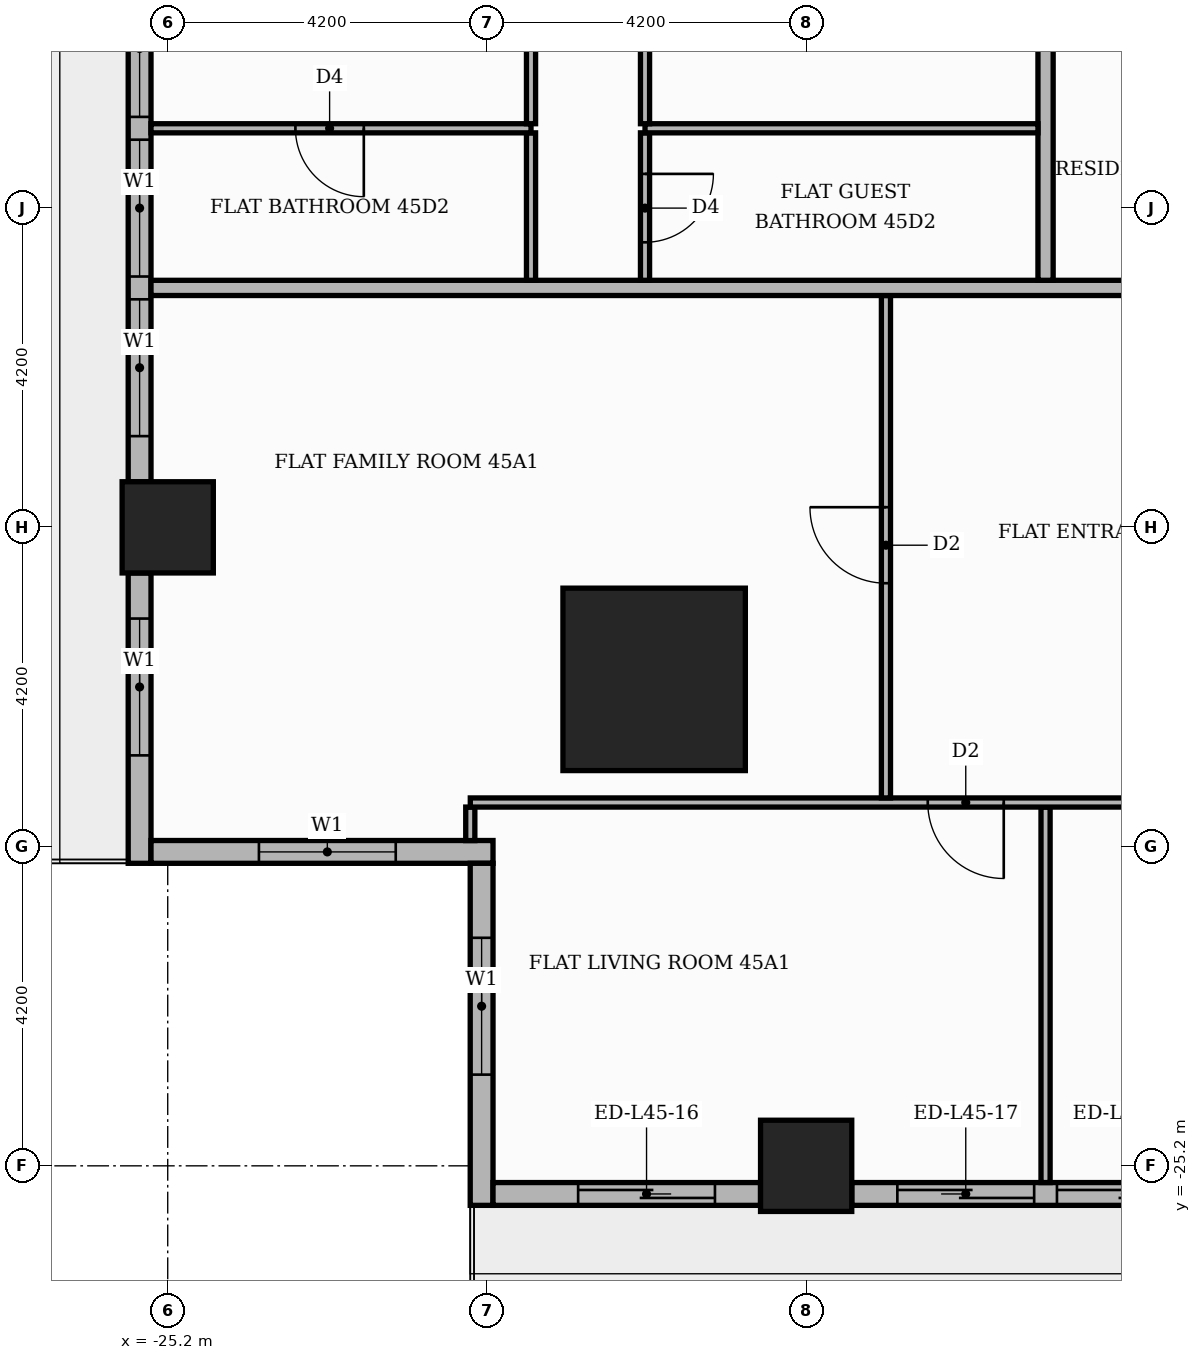
"""IFC4 building model, lengths in metres.
Left out: names, types, materials, properties, quantities, classifications, styles, units other than length and angle.
Written with IfcOpenShell. Run it as: python <this file> out.ifc"""

import sys

from ifc_helpers import new_model, si_unit, direction, frame, frame_2d, origin, origin_2d, place, context, subcontext, project, spatial, rectangle, extrude, element, fill, save


model = new_model("IFC4")
c1 = context("Model", 3, precision=1e-05, world=origin(), true_north=direction((0.0, 1.0)))
c2 = subcontext(c1, "Body", "Model", "MODEL_VIEW")
j1 = project(units=[si_unit("LENGTHUNIT", "METRE"), si_unit("PLANEANGLEUNIT", "RADIAN")], contexts=[c1])
p1 = place(None, origin())
s1 = spatial("IfcSite", under=j1, at=p1, CompositionType="ELEMENT")
p2 = place(p1, origin())
s2 = spatial("IfcBuilding", under=s1, at=p2, CompositionType="ELEMENT")
p3 = place(p2, frame((0.0, 0.0, 192.3)))
s3 = spatial("IfcBuildingStorey", under=s2, at=p3, CompositionType="ELEMENT", Elevation=192.3)
p4 = place(p3, frame((-18.8, -18.8, 0.0), z_axis=(0.0, 0.0, 1.0), x_axis=(1.0, 0.0, 0.0)))
e1 = element("IfcColumn", 1, at=p4, inside=s3, PredefinedType="COLUMN", context=c2, shape_type="SweptSolid", body=[
    extrude(rectangle(XDim=2.4, YDim=2.4, at=origin_2d()), origin(), (0.0, 0.0, 1.0), 3.9),
])
for number, where, z_axis, x_axis in (
    (2, (-16.8, -25.2, 0.0), (0.0, 0.0, 1.0), (1.0, 0.0, 0.0)),
    (3, (-25.2, -16.8, 0.0), (0.0, 0.0, 1.0), (1.0, 0.0, 0.0)),
):
    element("IfcColumn", number, at=place(p3, frame(where, z_axis=z_axis, x_axis=x_axis)), inside=s3, PredefinedType="COLUMN", context=c2, shape_type="SweptSolid", body=[
        extrude(rectangle(XDim=1.2, YDim=1.2, at=origin_2d()), origin(), (0.0, 0.0, 1.0), 3.9),
    ])
p5 = place(p3, frame((-25.57, -9.0, 0.0), z_axis=(0.0, 0.0, 1.0), x_axis=(0.0, -1.0, 0.0)))
e4 = element("IfcWall", 4, at=p5, inside=s3, PredefinedType="STANDARD", context=c2, shape_type="SweptSolid", body=[
    extrude(rectangle(XDim=7.2, YDim=0.3, at=frame_2d((3.6, 0.0))), origin(), (0.0, 0.0, 1.0), 3.48),
])
p6 = place(p5, frame((0.6, 0.0, 0.9)))
e5 = element("IfcOpeningElement", 5, at=p6, cuts=e4, PredefinedType="OPENING", context=c2, shape_type="SweptSolid", body=[
    extrude(rectangle(XDim=1.8, YDim=2.1, at=frame_2d((0.9, 1.05))), frame((0.0, 0.16, 0.0), z_axis=(0.0, -1.0, 0.0), x_axis=(1.0, 0.0, 0.0)), (0.0, 0.0, 1.0), 0.32),
])
p7 = place(p5, frame((2.7, 0.0, 0.9)))
e6 = element("IfcOpeningElement", 6, at=p7, cuts=e4, PredefinedType="OPENING", context=c2, shape_type="SweptSolid", body=[
    extrude(rectangle(XDim=1.8, YDim=2.1, at=frame_2d((0.9, 1.05))), frame((0.0, 0.16, 0.0), z_axis=(0.0, -1.0, 0.0), x_axis=(1.0, 0.0, 0.0)), (0.0, 0.0, 1.0), 0.32),
])
p8 = place(p5, frame((4.8, 0.0, 0.9)))
e7 = element("IfcOpeningElement", 7, at=p8, cuts=e4, PredefinedType="OPENING", context=c2, shape_type="SweptSolid", body=[
    extrude(rectangle(XDim=1.8, YDim=2.1, at=frame_2d((0.9, 1.05))), frame((0.0, 0.16, 0.0), z_axis=(0.0, -1.0, 0.0), x_axis=(1.0, 0.0, 0.0)), (0.0, 0.0, 1.0), 0.32),
])
p9 = place(p3, frame((-25.57, -17.4, 0.0), z_axis=(0.0, 0.0, 1.0), x_axis=(0.0, -1.0, 0.0)))
e8 = element("IfcWall", 8, at=p9, inside=s3, PredefinedType="STANDARD", context=c2, shape_type="SweptSolid", body=[
    extrude(rectangle(XDim=3.82, YDim=0.3, at=frame_2d((1.91, 0.0))), origin(), (0.0, 0.0, 1.0), 3.48),
])
p10 = place(p9, frame((0.6, 0.0, 0.9)))
e9 = element("IfcOpeningElement", 9, at=p10, cuts=e8, PredefinedType="OPENING", context=c2, shape_type="SweptSolid", body=[
    extrude(rectangle(XDim=1.8, YDim=2.1, at=frame_2d((0.9, 1.05))), frame((0.0, 0.16, 0.0), z_axis=(0.0, -1.0, 0.0), x_axis=(1.0, 0.0, 0.0)), (0.0, 0.0, 1.0), 0.32),
])
p11 = place(p3, frame((-25.42, -21.07, 0.0), z_axis=(0.0, 0.0, 1.0), x_axis=(1.0, 0.0, 0.0)))
e10 = element("IfcWall", 10, at=p11, inside=s3, PredefinedType="STANDARD", context=c2, shape_type="SweptSolid", body=[
    extrude(rectangle(XDim=4.5, YDim=0.3, at=frame_2d((2.25, 0.0))), origin(), (0.0, 0.0, 1.0), 3.48),
])
p12 = place(p11, frame((1.42, 0.0, 0.9)))
e11 = element("IfcOpeningElement", 11, at=p12, cuts=e10, PredefinedType="OPENING", context=c2, shape_type="SweptSolid", body=[
    extrude(rectangle(XDim=1.8, YDim=2.1, at=frame_2d((0.9, 1.05))), frame((0.0, 0.16, 0.0), z_axis=(0.0, -1.0, 0.0), x_axis=(1.0, 0.0, 0.0)), (0.0, 0.0, 1.0), 0.32),
])
p13 = place(p3, frame((-21.07, -21.22, 0.0), z_axis=(0.0, 0.0, 1.0), x_axis=(0.0, -1.0, 0.0)))
e12 = element("IfcWall", 12, at=p13, inside=s3, PredefinedType="STANDARD", context=c2, shape_type="SweptSolid", body=[
    extrude(rectangle(XDim=4.5, YDim=0.3, at=frame_2d((2.25, 0.0))), origin(), (0.0, 0.0, 1.0), 3.48),
])
p14 = place(p13, frame((0.98, 0.0, 0.9)))
e13 = element("IfcOpeningElement", 13, at=p14, cuts=e12, PredefinedType="OPENING", context=c2, shape_type="SweptSolid", body=[
    extrude(rectangle(XDim=1.8, YDim=2.1, at=frame_2d((0.9, 1.05))), frame((0.0, 0.16, 0.0), z_axis=(0.0, -1.0, 0.0), x_axis=(1.0, 0.0, 0.0)), (0.0, 0.0, 1.0), 0.32),
])
p15 = place(p3, frame((-20.92, -25.57, 0.0), z_axis=(0.0, 0.0, 1.0), x_axis=(1.0, 0.0, 0.0)))
e14 = element("IfcWall", 14, at=p15, inside=s3, PredefinedType="STANDARD", context=c2, shape_type="SweptSolid", body=[
    extrude(rectangle(XDim=3.52, YDim=0.3, at=frame_2d((1.76, 0.0))), origin(), (0.0, 0.0, 1.0), 3.48),
])
p16 = place(p15, frame((1.12, 0.0, 0.0)))
e15 = element("IfcOpeningElement", 15, at=p16, cuts=e14, PredefinedType="OPENING", context=c2, shape_type="SweptSolid", body=[
    extrude(rectangle(XDim=1.8, YDim=2.4, at=frame_2d((0.9, 1.2))), frame((0.0, 0.16, 0.0), z_axis=(0.0, -1.0, 0.0), x_axis=(1.0, 0.0, 0.0)), (0.0, 0.0, 1.0), 0.32),
])
p17 = place(p3, frame((-16.2, -25.57, 0.0), z_axis=(0.0, 0.0, 1.0), x_axis=(1.0, 0.0, 0.0)))
e16 = element("IfcWall", 16, at=p17, inside=s3, PredefinedType="STANDARD", context=c2, shape_type="SweptSolid", body=[
    extrude(rectangle(XDim=7.2, YDim=0.3, at=frame_2d((3.6, 0.0))), origin(), (0.0, 0.0, 1.0), 3.48),
])
p18 = place(p17, frame((0.6, 0.0, 0.0)))
e17 = element("IfcOpeningElement", 17, at=p18, cuts=e16, PredefinedType="OPENING", context=c2, shape_type="SweptSolid", body=[
    extrude(rectangle(XDim=1.8, YDim=2.4, at=frame_2d((0.9, 1.2))), frame((0.0, 0.16, 0.0), z_axis=(0.0, -1.0, 0.0), x_axis=(1.0, 0.0, 0.0)), (0.0, 0.0, 1.0), 0.32),
])
p19 = place(p17, frame((2.7, 0.0, 0.0)))
e18 = element("IfcOpeningElement", 18, at=p19, cuts=e16, PredefinedType="OPENING", context=c2, shape_type="SweptSolid", body=[
    extrude(rectangle(XDim=1.8, YDim=2.4, at=frame_2d((0.9, 1.2))), frame((0.0, 0.16, 0.0), z_axis=(0.0, -1.0, 0.0), x_axis=(1.0, 0.0, 0.0)), (0.0, 0.0, 1.0), 0.32),
])
p20 = place(p17, frame((4.8, 0.0, 0.9)))
e19 = element("IfcOpeningElement", 19, at=p20, cuts=e16, PredefinedType="OPENING", context=c2, shape_type="SweptSolid", body=[
    extrude(rectangle(XDim=1.8, YDim=2.1, at=frame_2d((0.9, 1.05))), frame((0.0, 0.16, 0.0), z_axis=(0.0, -1.0, 0.0), x_axis=(1.0, 0.0, 0.0)), (0.0, 0.0, 1.0), 0.32),
])
p21 = place(p3, frame((-13.65, -25.42, 0.0), z_axis=(0.0, 0.0, 1.0), x_axis=(0.0, 1.0, 0.0)))
e20 = element("IfcWall", 20, at=p21, inside=s3, PredefinedType="PARTITIONING", context=c2, shape_type="SweptSolid", body=[
    extrude(rectangle(XDim=4.94, YDim=0.12, at=frame_2d((2.47, 0.0))), origin(), (0.0, 0.0, 1.0), 3.48),
])
p22 = place(p3, frame((-21.219, -20.921, 0.0), z_axis=(0.0, 0.0, 1.0), x_axis=(0.0, 1.0, 0.0)))
e21 = element("IfcWall", 21, at=p22, inside=s3, PredefinedType="PARTITIONING", context=c2, shape_type="SweptSolid", body=[
    extrude(rectangle(XDim=0.441, YDim=0.12, at=frame_2d((0.22, 0.0))), origin(), (0.0, 0.0, 1.0), 3.48),
])
p23 = place(p3, frame((-21.219, -20.42, 0.0), z_axis=(0.0, 0.0, 1.0), x_axis=(1.0, 0.0, 0.0)))
e22 = element("IfcWall", 22, at=p23, inside=s3, PredefinedType="PARTITIONING", context=c2, shape_type="SweptSolid", body=[
    extrude(rectangle(XDim=15.869, YDim=0.12, at=frame_2d((7.935, 0.0))), origin(), (0.0, 0.0, 1.0), 3.48),
])
p24 = place(p23, frame((6.019, 0.0, 0.0)))
e23 = element("IfcOpeningElement", 23, at=p24, cuts=e22, PredefinedType="OPENING", context=c2, shape_type="SweptSolid", body=[
    extrude(rectangle(XDim=1.0, YDim=2.1, at=frame_2d((0.5, 1.05))), frame((0.0, 0.07, 0.0), z_axis=(0.0, -1.0, 0.0), x_axis=(1.0, 0.0, 0.0)), (0.0, 0.0, 1.0), 0.14),
])
p25 = place(p23, frame((9.219, 0.0, 0.0)))
e24 = element("IfcOpeningElement", 24, at=p25, cuts=e22, PredefinedType="OPENING", context=c2, shape_type="SweptSolid", body=[
    extrude(rectangle(XDim=0.9, YDim=2.1, at=frame_2d((0.45, 1.05))), frame((0.0, 0.07, 0.0), z_axis=(0.0, -1.0, 0.0), x_axis=(1.0, 0.0, 0.0)), (0.0, 0.0, 1.0), 0.14),
])
p26 = place(p3, frame((-15.75, -20.36, 0.0), z_axis=(0.0, 0.0, 1.0), x_axis=(0.0, 1.0, 0.0)))
e25 = element("IfcWall", 25, at=p26, inside=s3, PredefinedType="PARTITIONING", context=c2, shape_type="SweptSolid", body=[
    extrude(rectangle(XDim=6.61, YDim=0.12, at=frame_2d((3.305, 0.0))), origin(), (0.0, 0.0, 1.0), 3.48),
])
p27 = place(p26, frame((2.825, 0.0, 0.0)))
e26 = element("IfcOpeningElement", 26, at=p27, cuts=e25, PredefinedType="OPENING", context=c2, shape_type="SweptSolid", body=[
    extrude(rectangle(XDim=1.0, YDim=2.1, at=frame_2d((0.5, 1.05))), frame((0.0, 0.07, 0.0), z_axis=(0.0, -1.0, 0.0), x_axis=(1.0, 0.0, 0.0)), (0.0, 0.0, 1.0), 0.14),
])
p28 = place(p3, frame((-25.42, -13.65, 0.0), z_axis=(0.0, 0.0, 1.0), x_axis=(1.0, 0.0, 0.0)))
e27 = element("IfcWall", 27, at=p28, inside=s3, PredefinedType="PARTITIONING", context=c2, shape_type="SweptSolid", body=[
    extrude(rectangle(XDim=39.07, YDim=0.2, at=frame_2d((19.535, 0.0))), origin(), (0.0, 0.0, 1.0), 3.48),
])
p29 = place(p28, frame((13.32, 0.0, 0.0)))
e28 = element("IfcOpeningElement", 28, at=p29, cuts=e27, PredefinedType="OPENING", context=c2, shape_type="SweptSolid", body=[
    extrude(rectangle(XDim=1.1, YDim=2.4, at=frame_2d((0.55, 1.2))), frame((0.0, 0.11, 0.0), z_axis=(0.0, -1.0, 0.0), x_axis=(1.0, 0.0, 0.0)), (0.0, 0.0, 1.0), 0.22),
])
p30 = place(p28, frame((25.92, 0.0, 0.0)))
e29 = element("IfcOpeningElement", 29, at=p30, cuts=e27, PredefinedType="OPENING", context=c2, shape_type="SweptSolid", body=[
    extrude(rectangle(XDim=1.1, YDim=2.4, at=frame_2d((0.55, 1.2))), frame((0.0, 0.11, 0.0), z_axis=(0.0, -1.0, 0.0), x_axis=(1.0, 0.0, 0.0)), (0.0, 0.0, 1.0), 0.22),
])
p31 = place(p3, frame((-20.42, -13.55, 0.0), z_axis=(0.0, 0.0, 1.0), x_axis=(0.0, 1.0, 0.0)))
e30 = element("IfcWall", 30, at=p31, inside=s3, PredefinedType="PARTITIONING", context=c2, shape_type="SweptSolid", body=[
    extrude(rectangle(XDim=1.94, YDim=0.12, at=frame_2d((0.97, 0.0))), origin(), (0.0, 0.0, 1.0), 3.48),
])
p32 = place(p3, frame((-18.92, -13.55, 0.0), z_axis=(0.0, 0.0, 1.0), x_axis=(0.0, 1.0, 0.0)))
e31 = element("IfcWall", 31, at=p32, inside=s3, PredefinedType="PARTITIONING", context=c2, shape_type="SweptSolid", body=[
    extrude(rectangle(XDim=1.94, YDim=0.12, at=frame_2d((0.97, 0.0))), origin(), (0.0, 0.0, 1.0), 3.48),
])
p33 = place(p32, frame((0.5, 0.0, 0.0)))
e32 = element("IfcOpeningElement", 32, at=p33, cuts=e31, PredefinedType="OPENING", context=c2, shape_type="SweptSolid", body=[
    extrude(rectangle(XDim=0.9, YDim=2.1, at=frame_2d((0.45, 1.05))), frame((0.0, 0.07, 0.0), z_axis=(0.0, -1.0, 0.0), x_axis=(1.0, 0.0, 0.0)), (0.0, 0.0, 1.0), 0.14),
])
p34 = place(p3, frame((-13.65, -13.55, 0.0), z_axis=(0.0, 0.0, 1.0), x_axis=(0.0, 1.0, 0.0)))
e33 = element("IfcWall", 33, at=p34, inside=s3, PredefinedType="PARTITIONING", context=c2, shape_type="SweptSolid", body=[
    extrude(rectangle(XDim=18.7, YDim=0.2, at=frame_2d((9.35, 0.0))), origin(), (0.0, 0.0, 1.0), 3.48),
])
p35 = place(p34, frame((16.15, 0.0, 0.0)))
e34 = element("IfcOpeningElement", 34, at=p35, cuts=e33, PredefinedType="OPENING", context=c2, shape_type="SweptSolid", body=[
    extrude(rectangle(XDim=1.1, YDim=2.4, at=frame_2d((0.55, 1.2))), frame((0.0, 0.11, 0.0), z_axis=(0.0, -1.0, 0.0), x_axis=(1.0, 0.0, 0.0)), (0.0, 0.0, 1.0), 0.22),
])
p36 = place(p3, frame((-25.42, -11.55, 0.0), z_axis=(0.0, 0.0, 1.0), x_axis=(1.0, 0.0, 0.0)))
e35 = element("IfcWall", 35, at=p36, inside=s3, PredefinedType="PARTITIONING", context=c2, shape_type="SweptSolid", body=[
    extrude(rectangle(XDim=5.0, YDim=0.12, at=frame_2d((2.5, 0.0))), origin(), (0.0, 0.0, 1.0), 3.48),
])
p37 = place(p36, frame((1.9, 0.0, 0.0)))
e36 = element("IfcOpeningElement", 36, at=p37, cuts=e35, PredefinedType="OPENING", context=c2, shape_type="SweptSolid", body=[
    extrude(rectangle(XDim=0.9, YDim=2.1, at=frame_2d((0.45, 1.05))), frame((0.0, 0.07, 0.0), z_axis=(0.0, -1.0, 0.0), x_axis=(1.0, 0.0, 0.0)), (0.0, 0.0, 1.0), 0.14),
])
p38 = place(p3, frame((-18.92, -11.55, 0.0), z_axis=(0.0, 0.0, 1.0), x_axis=(1.0, 0.0, 0.0)))
e37 = element("IfcWall", 37, at=p38, inside=s3, PredefinedType="PARTITIONING", context=c2, shape_type="SweptSolid", body=[
    extrude(rectangle(XDim=5.17, YDim=0.12, at=frame_2d((2.585, 0.0))), origin(), (0.0, 0.0, 1.0), 3.48),
])
p39 = place(p3, frame((-20.42, -11.49, 0.0), z_axis=(0.0, 0.0, 1.0), x_axis=(0.0, 1.0, 0.0)))
e38 = element("IfcWall", 38, at=p39, inside=s3, PredefinedType="PARTITIONING", context=c2, shape_type="SweptSolid", body=[
    extrude(rectangle(XDim=1.98, YDim=0.12, at=frame_2d((0.99, 0.0))), origin(), (0.0, 0.0, 1.0), 3.48),
])
p40 = place(p3, frame((-18.92, -11.49, 0.0), z_axis=(0.0, 0.0, 1.0), x_axis=(0.0, 1.0, 0.0)))
e39 = element("IfcWall", 39, at=p40, inside=s3, PredefinedType="PARTITIONING", context=c2, shape_type="SweptSolid", body=[
    extrude(rectangle(XDim=3.63, YDim=0.12, at=frame_2d((1.815, 0.0))), origin(), (0.0, 0.0, 1.0), 3.48),
])
p41 = place(p40, frame((1.365, 0.0, 0.0)))
e40 = element("IfcOpeningElement", 40, at=p41, cuts=e39, PredefinedType="OPENING", context=c2, shape_type="SweptSolid", body=[
    extrude(rectangle(XDim=0.9, YDim=2.1, at=frame_2d((0.45, 1.05))), frame((0.0, 0.07, 0.0), z_axis=(0.0, -1.0, 0.0), x_axis=(1.0, 0.0, 0.0)), (0.0, 0.0, 1.0), 0.14),
])
p42 = place(p6, origin())
e41 = element("IfcWindow", 41, at=p42, inside=s3, PartitioningType="SINGLE_PANEL", PredefinedType="WINDOW", context=c2, shape_type="SweptSolid", body=[
    extrude(rectangle(XDim=1.8, YDim=2.1, at=frame_2d((0.9, 1.05))), frame((0.0, 0.03, 0.0), z_axis=(0.0, -1.0, 0.0), x_axis=(1.0, 0.0, 0.0)), (0.0, 0.0, 1.0), 0.06),
])
fill(e5, e41)
p43 = place(p7, origin())
e42 = element("IfcWindow", 42, at=p43, inside=s3, PartitioningType="SINGLE_PANEL", PredefinedType="WINDOW", context=c2, shape_type="SweptSolid", body=[
    extrude(rectangle(XDim=1.8, YDim=2.1, at=frame_2d((0.9, 1.05))), frame((0.0, 0.03, 0.0), z_axis=(0.0, -1.0, 0.0), x_axis=(1.0, 0.0, 0.0)), (0.0, 0.0, 1.0), 0.06),
])
fill(e6, e42)
p44 = place(p8, origin())
e43 = element("IfcWindow", 43, at=p44, inside=s3, PartitioningType="SINGLE_PANEL", PredefinedType="WINDOW", context=c2, shape_type="SweptSolid", body=[
    extrude(rectangle(XDim=1.8, YDim=2.1, at=frame_2d((0.9, 1.05))), frame((0.0, 0.03, 0.0), z_axis=(0.0, -1.0, 0.0), x_axis=(1.0, 0.0, 0.0)), (0.0, 0.0, 1.0), 0.06),
])
fill(e7, e43)
p45 = place(p10, origin())
e44 = element("IfcWindow", 44, at=p45, inside=s3, PartitioningType="SINGLE_PANEL", PredefinedType="WINDOW", context=c2, shape_type="SweptSolid", body=[
    extrude(rectangle(XDim=1.8, YDim=2.1, at=frame_2d((0.9, 1.05))), frame((0.0, 0.03, 0.0), z_axis=(0.0, -1.0, 0.0), x_axis=(1.0, 0.0, 0.0)), (0.0, 0.0, 1.0), 0.06),
])
fill(e9, e44)
p46 = place(p12, origin())
e45 = element("IfcWindow", 45, at=p46, inside=s3, PartitioningType="SINGLE_PANEL", PredefinedType="WINDOW", context=c2, shape_type="SweptSolid", body=[
    extrude(rectangle(XDim=1.8, YDim=2.1, at=frame_2d((0.9, 1.05))), frame((0.0, 0.03, 0.0), z_axis=(0.0, -1.0, 0.0), x_axis=(1.0, 0.0, 0.0)), (0.0, 0.0, 1.0), 0.06),
])
fill(e11, e45)
p47 = place(p14, origin())
e46 = element("IfcWindow", 46, at=p47, inside=s3, PartitioningType="SINGLE_PANEL", PredefinedType="WINDOW", context=c2, shape_type="SweptSolid", body=[
    extrude(rectangle(XDim=1.8, YDim=2.1, at=frame_2d((0.9, 1.05))), frame((0.0, 0.03, 0.0), z_axis=(0.0, -1.0, 0.0), x_axis=(1.0, 0.0, 0.0)), (0.0, 0.0, 1.0), 0.06),
])
fill(e13, e46)
p48 = place(p16, origin())
e47 = element("IfcDoor", 47, at=p48, inside=s3, OperationType="SLIDING_TO_RIGHT", PredefinedType="DOOR", context=c2, shape_type="SweptSolid", body=[
    extrude(rectangle(XDim=1.8, YDim=2.4, at=frame_2d((0.9, 1.2))), frame((0.0, 0.025, 0.0), z_axis=(0.0, -1.0, 0.0), x_axis=(1.0, 0.0, 0.0)), (0.0, 0.0, 1.0), 0.05),
])
fill(e15, e47)
p49 = place(p18, origin())
e48 = element("IfcDoor", 48, at=p49, inside=s3, OperationType="SLIDING_TO_LEFT", PredefinedType="DOOR", context=c2, shape_type="SweptSolid", body=[
    extrude(rectangle(XDim=1.8, YDim=2.4, at=frame_2d((0.9, 1.2))), frame((0.0, 0.025, 0.0), z_axis=(0.0, -1.0, 0.0), x_axis=(1.0, 0.0, 0.0)), (0.0, 0.0, 1.0), 0.05),
])
fill(e17, e48)
p50 = place(p19, origin())
e49 = element("IfcDoor", 49, at=p50, inside=s3, OperationType="SLIDING_TO_RIGHT", PredefinedType="DOOR", context=c2, shape_type="SweptSolid", body=[
    extrude(rectangle(XDim=1.8, YDim=2.4, at=frame_2d((0.9, 1.2))), frame((0.0, 0.025, 0.0), z_axis=(0.0, -1.0, 0.0), x_axis=(1.0, 0.0, 0.0)), (0.0, 0.0, 1.0), 0.05),
])
fill(e18, e49)
p51 = place(p27, origin())
e50 = element("IfcDoor", 50, at=p51, inside=s3, OperationType="SINGLE_SWING_RIGHT", PredefinedType="DOOR", context=c2, shape_type="SweptSolid", body=[
    extrude(rectangle(XDim=1.0, YDim=2.1, at=frame_2d((0.5, 1.05))), frame((0.0, 0.025, 0.0), z_axis=(0.0, -1.0, 0.0), x_axis=(1.0, 0.0, 0.0)), (0.0, 0.0, 1.0), 0.05),
])
fill(e26, e50)
p52 = place(p24, frame((1.0, 0.0, 0.0), z_axis=(0.0, 0.0, 1.0), x_axis=(-1.0, 0.0, 0.0)))
e51 = element("IfcDoor", 51, at=p52, inside=s3, OperationType="SINGLE_SWING_RIGHT", PredefinedType="DOOR", context=c2, shape_type="SweptSolid", body=[
    extrude(rectangle(XDim=1.0, YDim=2.1, at=frame_2d((0.5, 1.05))), frame((0.0, 0.025, 0.0), z_axis=(0.0, -1.0, 0.0), x_axis=(1.0, 0.0, 0.0)), (0.0, 0.0, 1.0), 0.05),
])
fill(e23, e51)
p53 = place(p33, frame((0.9, 0.0, 0.0), z_axis=(0.0, 0.0, 1.0), x_axis=(-1.0, 0.0, 0.0)))
e52 = element("IfcDoor", 52, at=p53, inside=s3, OperationType="SINGLE_SWING_RIGHT", PredefinedType="DOOR", context=c2, shape_type="SweptSolid", body=[
    extrude(rectangle(XDim=0.9, YDim=2.1, at=frame_2d((0.45, 1.05))), frame((0.0, 0.025, 0.0), z_axis=(0.0, -1.0, 0.0), x_axis=(1.0, 0.0, 0.0)), (0.0, 0.0, 1.0), 0.05),
])
fill(e32, e52)
p54 = place(p37, frame((0.9, 0.0, 0.0), z_axis=(0.0, 0.0, 1.0), x_axis=(-1.0, 0.0, 0.0)))
e53 = element("IfcDoor", 53, at=p54, inside=s3, OperationType="SINGLE_SWING_RIGHT", PredefinedType="DOOR", context=c2, shape_type="SweptSolid", body=[
    extrude(rectangle(XDim=0.9, YDim=2.1, at=frame_2d((0.45, 1.05))), frame((0.0, 0.025, 0.0), z_axis=(0.0, -1.0, 0.0), x_axis=(1.0, 0.0, 0.0)), (0.0, 0.0, 1.0), 0.05),
])
fill(e36, e53)
save(model, sys.argv[1])
